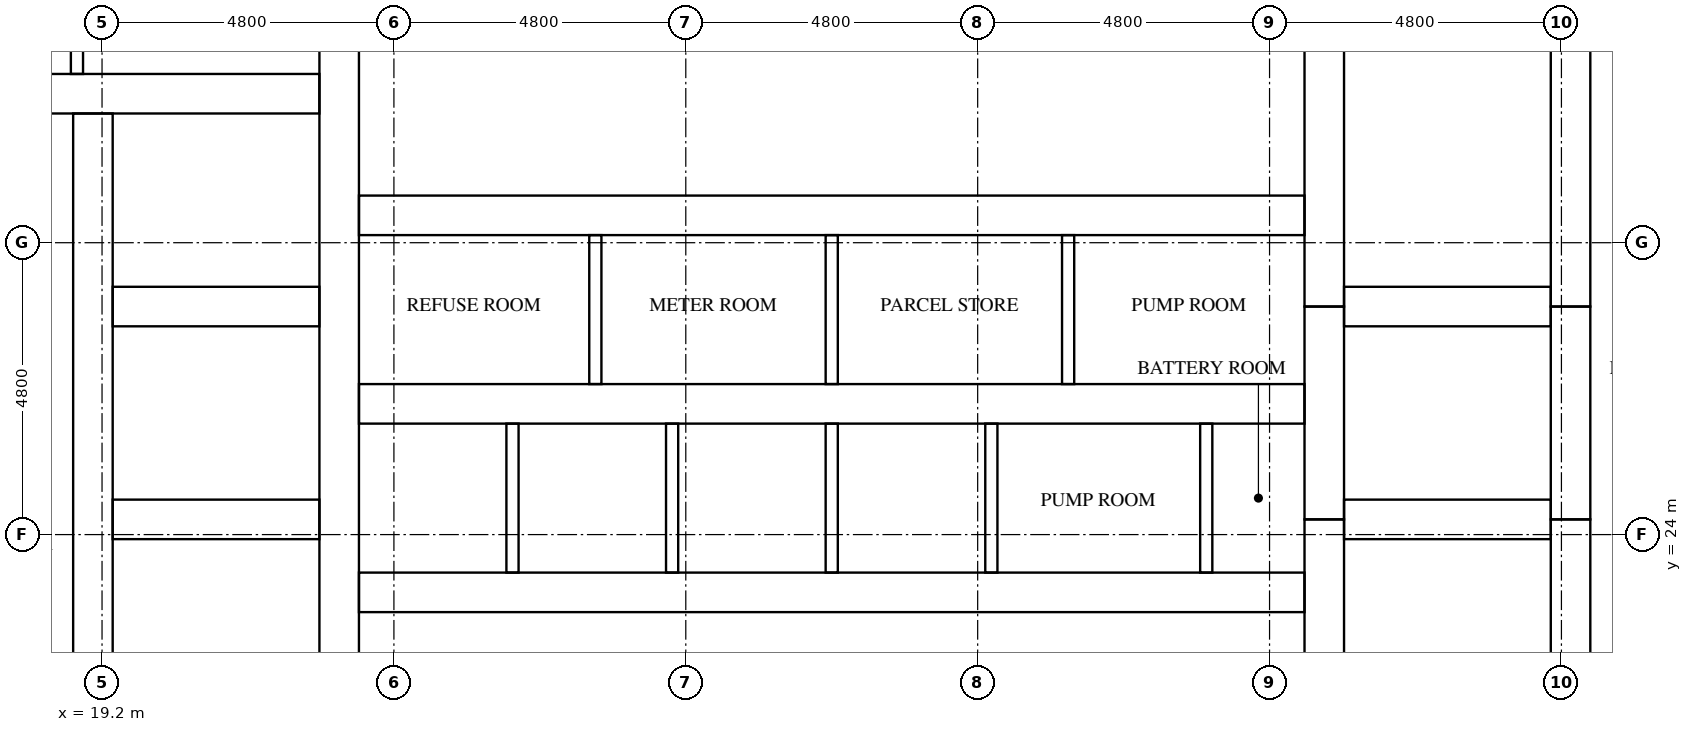
"""IFC4 building model, lengths in metres.
Left out: names, types, materials, properties, quantities, classifications, styles, units other than length and angle.
Written with IfcOpenShell. Run it as: python <this file> out.ifc"""

import sys

from ifc_helpers import new_model, si_unit, direction, frame, frame_2d, origin, place, context, subcontext, project, spatial, rectangle, extrude, element, fill, save


model = new_model("IFC4")
c1 = context("Model", 3, precision=1e-05, world=origin(), true_north=direction((0.0, 1.0)))
c2 = subcontext(c1, "Body", "Model", "MODEL_VIEW")
j1 = project(units=[si_unit("LENGTHUNIT", "METRE"), si_unit("PLANEANGLEUNIT", "RADIAN")], contexts=[c1])
p1 = place(None, origin())
s1 = spatial("IfcSite", under=j1, at=p1, CompositionType="ELEMENT")
p2 = place(p1, origin())
s2 = spatial("IfcBuilding", under=s1, at=p2, CompositionType="ELEMENT")
p3 = place(p2, frame((0.0, 0.0, 59.3)))
s3 = spatial("IfcBuildingStorey", under=s2, at=p3, CompositionType="ELEMENT", Elevation=59.3)
p4 = place(p3, frame((19.05, 15.9, 0.0), z_axis=(0.0, 0.0, 1.0), x_axis=(0.0, 1.0, 0.0)))
e1 = element("IfcWall", 1, at=p4, inside=s3, PredefinedType="SHEAR", context=c2, shape_type="SweptSolid", body=[
    extrude(rectangle(XDim=15.025, YDim=0.65, at=frame_2d((7.513, 0.0))), origin(), (0.0, 0.0, 1.0), 3.2),
])
p5 = place(p4, frame((9.55, 0.0, 0.0)))
e2 = element("IfcOpeningElement", 2, at=p5, cuts=e1, PredefinedType="OPENING", context=c2, shape_type="SweptSolid", body=[
    extrude(rectangle(XDim=1.1, YDim=2.1, at=frame_2d((0.55, 1.05))), frame((0.0, 0.335, 0.0), z_axis=(0.0, -1.0, 0.0), x_axis=(1.0, 0.0, 0.0)), (0.0, 0.0, 1.0), 0.67),
])
p6 = place(p4, frame((13.05, 0.0, 0.0)))
e3 = element("IfcOpeningElement", 3, at=p6, cuts=e1, PredefinedType="OPENING", context=c2, shape_type="SweptSolid", body=[
    extrude(rectangle(XDim=1.1, YDim=2.1, at=frame_2d((0.55, 1.05))), frame((0.0, 0.335, 0.0), z_axis=(0.0, -1.0, 0.0), x_axis=(1.0, 0.0, 0.0)), (0.0, 0.0, 1.0), 0.67),
])
p7 = place(p4, frame((0.3, 0.0, 0.0)))
e4 = element("IfcOpeningElement", 4, at=p7, cuts=e1, PredefinedType="OPENING", context=c2, shape_type="SweptSolid", body=[
    extrude(rectangle(XDim=1.2, YDim=2.1, at=frame_2d((0.6, 1.05))), frame((0.0, 0.335, 0.0), z_axis=(0.0, -1.0, 0.0), x_axis=(1.0, 0.0, 0.0)), (0.0, 0.0, 1.0), 0.67),
])
p8 = place(p3, frame((23.1, 15.9, 0.0), z_axis=(0.0, 0.0, 1.0), x_axis=(0.0, 1.0, 0.0)))
e5 = element("IfcWall", 5, at=p8, inside=s3, PredefinedType="SHEAR", context=c2, shape_type="SweptSolid", body=[
    extrude(rectangle(XDim=21.0, YDim=0.65, at=frame_2d((10.5, 0.0))), origin(), (0.0, 0.0, 1.0), 3.2),
])
p9 = place(p3, frame((39.3, 15.9, 0.0), z_axis=(0.0, 0.0, 1.0), x_axis=(0.0, 1.0, 0.0)))
e6 = element("IfcWall", 6, at=p9, inside=s3, PredefinedType="SHEAR", context=c2, shape_type="SweptSolid", body=[
    extrude(rectangle(XDim=8.35, YDim=0.65, at=frame_2d((4.175, 0.0))), origin(), (0.0, 0.0, 1.0), 3.2),
])
p10 = place(p3, frame((39.3, 24.25, 0.0), z_axis=(0.0, 0.0, 1.0), x_axis=(0.0, 1.0, 0.0)))
e7 = element("IfcWall", 7, at=p10, inside=s3, PredefinedType="SHEAR", context=c2, shape_type="SweptSolid", body=[
    extrude(rectangle(XDim=3.5, YDim=0.65, at=frame_2d((1.75, 0.0))), origin(), (0.0, 0.0, 1.0), 3.2),
])
p11 = place(p3, frame((39.3, 27.75, 0.0), z_axis=(0.0, 0.0, 1.0), x_axis=(0.0, 1.0, 0.0)))
e8 = element("IfcWall", 8, at=p11, inside=s3, PredefinedType="SHEAR", context=c2, shape_type="SweptSolid", body=[
    extrude(rectangle(XDim=9.15, YDim=0.65, at=frame_2d((4.575, 0.0))), origin(), (0.0, 0.0, 1.0), 3.2),
])
p12 = place(p3, frame((43.35, 15.9, 0.0), z_axis=(0.0, 0.0, 1.0), x_axis=(0.0, 1.0, 0.0)))
e9 = element("IfcWall", 9, at=p12, inside=s3, PredefinedType="SHEAR", context=c2, shape_type="SweptSolid", body=[
    extrude(rectangle(XDim=8.35, YDim=0.65, at=frame_2d((4.175, 0.0))), origin(), (0.0, 0.0, 1.0), 3.2),
])
p13 = place(p12, frame((0.3, 0.0, 0.0)))
e10 = element("IfcOpeningElement", 10, at=p13, cuts=e9, PredefinedType="OPENING", context=c2, shape_type="SweptSolid", body=[
    extrude(rectangle(XDim=1.2, YDim=2.1, at=frame_2d((0.6, 1.05))), frame((0.0, 0.335, 0.0), z_axis=(0.0, -1.0, 0.0), x_axis=(1.0, 0.0, 0.0)), (0.0, 0.0, 1.0), 0.67),
])
p14 = place(p3, frame((43.35, 24.25, 0.0), z_axis=(0.0, 0.0, 1.0), x_axis=(0.0, 1.0, 0.0)))
e11 = element("IfcWall", 11, at=p14, inside=s3, PredefinedType="SHEAR", context=c2, shape_type="SweptSolid", body=[
    extrude(rectangle(XDim=3.5, YDim=0.65, at=frame_2d((1.75, 0.0))), origin(), (0.0, 0.0, 1.0), 3.2),
])
p15 = place(p14, frame((1.2, 0.0, 0.0)))
e12 = element("IfcOpeningElement", 12, at=p15, cuts=e11, PredefinedType="OPENING", context=c2, shape_type="SweptSolid", body=[
    extrude(rectangle(XDim=1.1, YDim=2.1, at=frame_2d((0.55, 1.05))), frame((0.0, 0.335, 0.0), z_axis=(0.0, -1.0, 0.0), x_axis=(1.0, 0.0, 0.0)), (0.0, 0.0, 1.0), 0.67),
])
p16 = place(p3, frame((43.35, 27.75, 0.0), z_axis=(0.0, 0.0, 1.0), x_axis=(0.0, 1.0, 0.0)))
e13 = element("IfcWall", 13, at=p16, inside=s3, PredefinedType="SHEAR", context=c2, shape_type="SweptSolid", body=[
    extrude(rectangle(XDim=9.15, YDim=0.65, at=frame_2d((4.575, 0.0))), origin(), (0.0, 0.0, 1.0), 3.2),
])
p17 = place(p16, frame((7.65, 0.0, 0.0)))
e14 = element("IfcOpeningElement", 14, at=p17, cuts=e13, PredefinedType="OPENING", context=c2, shape_type="SweptSolid", body=[
    extrude(rectangle(XDim=1.2, YDim=2.1, at=frame_2d((0.6, 1.05))), frame((0.0, 0.335, 0.0), z_axis=(0.0, -1.0, 0.0), x_axis=(1.0, 0.0, 0.0)), (0.0, 0.0, 1.0), 0.67),
])
for number, where, z_axis, x_axis in (
    (15, (19.375, 24.25, 0.0), (0.0, 0.0, 1.0), (1.0, 0.0, 0.0)),
    (16, (19.375, 27.75, 0.0), (0.0, 0.0, 1.0), (1.0, 0.0, 0.0)),
):
    element("IfcWall", number, at=place(p3, frame(where, z_axis=z_axis, x_axis=x_axis)), inside=s3, PredefinedType="SHEAR", context=c2, shape_type="SweptSolid", body=[
        extrude(rectangle(XDim=3.4, YDim=0.65, at=frame_2d((1.7, 0.0))), origin(), (0.0, 0.0, 1.0), 3.2),
    ])
p18 = place(p3, frame((15.9, 31.25, 0.0), z_axis=(0.0, 0.0, 1.0), x_axis=(1.0, 0.0, 0.0)))
e17 = element("IfcWall", 17, at=p18, inside=s3, PredefinedType="SHEAR", context=c2, shape_type="SweptSolid", body=[
    extrude(rectangle(XDim=6.875, YDim=0.65, at=frame_2d((3.438, 0.0))), origin(), (0.0, 0.0, 1.0), 3.2),
])
for number, where, z_axis, x_axis in (
    (18, (39.625, 24.25, 0.0), (0.0, 0.0, 1.0), (1.0, 0.0, 0.0)),
    (19, (39.625, 27.75, 0.0), (0.0, 0.0, 1.0), (1.0, 0.0, 0.0)),
):
    element("IfcWall", number, at=place(p3, frame(where, z_axis=z_axis, x_axis=x_axis)), inside=s3, PredefinedType="SHEAR", context=c2, shape_type="SweptSolid", body=[
        extrude(rectangle(XDim=3.4, YDim=0.65, at=frame_2d((1.7, 0.0))), origin(), (0.0, 0.0, 1.0), 3.2),
    ])
p19 = place(p3, frame((23.425, 23.05, 0.0), z_axis=(0.0, 0.0, 1.0), x_axis=(1.0, 0.0, 0.0)))
e20 = element("IfcWall", 20, at=p19, inside=s3, PredefinedType="SHEAR", context=c2, shape_type="SweptSolid", body=[
    extrude(rectangle(XDim=15.55, YDim=0.65, at=frame_2d((7.775, 0.0))), origin(), (0.0, 0.0, 1.0), 3.2),
])
p20 = place(p19, frame((0.663, 0.0, 0.0)))
e21 = element("IfcOpeningElement", 21, at=p20, cuts=e20, PredefinedType="OPENING", context=c2, shape_type="SweptSolid", body=[
    extrude(rectangle(XDim=1.1, YDim=2.1, at=frame_2d((0.55, 1.05))), frame((0.0, 0.335, 0.0), z_axis=(0.0, -1.0, 0.0), x_axis=(1.0, 0.0, 0.0)), (0.0, 0.0, 1.0), 0.67),
])
p21 = place(p19, frame((3.288, 0.0, 0.0)))
e22 = element("IfcOpeningElement", 22, at=p21, cuts=e20, PredefinedType="OPENING", context=c2, shape_type="SweptSolid", body=[
    extrude(rectangle(XDim=1.1, YDim=2.1, at=frame_2d((0.55, 1.05))), frame((0.0, 0.335, 0.0), z_axis=(0.0, -1.0, 0.0), x_axis=(1.0, 0.0, 0.0)), (0.0, 0.0, 1.0), 0.67),
])
p22 = place(p19, frame((11.667, 0.0, 0.0)))
e23 = element("IfcOpeningElement", 23, at=p22, cuts=e20, PredefinedType="OPENING", context=c2, shape_type="SweptSolid", body=[
    extrude(rectangle(XDim=1.0, YDim=2.1, at=frame_2d((0.5, 1.05))), frame((0.0, 0.335, 0.0), z_axis=(0.0, -1.0, 0.0), x_axis=(1.0, 0.0, 0.0)), (0.0, 0.0, 1.0), 0.67),
])
p23 = place(p19, frame((14.292, 0.0, 0.0)))
e24 = element("IfcOpeningElement", 24, at=p23, cuts=e20, PredefinedType="OPENING", context=c2, shape_type="SweptSolid", body=[
    extrude(rectangle(XDim=1.0, YDim=2.1, at=frame_2d((0.5, 1.05))), frame((0.0, 0.335, 0.0), z_axis=(0.0, -1.0, 0.0), x_axis=(1.0, 0.0, 0.0)), (0.0, 0.0, 1.0), 0.67),
])
p24 = place(p3, frame((23.425, 26.15, 0.0), z_axis=(0.0, 0.0, 1.0), x_axis=(1.0, 0.0, 0.0)))
e25 = element("IfcWall", 25, at=p24, inside=s3, PredefinedType="SHEAR", context=c2, shape_type="SweptSolid", body=[
    extrude(rectangle(XDim=15.55, YDim=0.65, at=frame_2d((7.775, 0.0))), origin(), (0.0, 0.0, 1.0), 3.2),
])
p25 = place(p3, frame((23.425, 29.25, 0.0), z_axis=(0.0, 0.0, 1.0), x_axis=(1.0, 0.0, 0.0)))
e26 = element("IfcWall", 26, at=p25, inside=s3, PredefinedType="SHEAR", context=c2, shape_type="SweptSolid", body=[
    extrude(rectangle(XDim=15.55, YDim=0.65, at=frame_2d((7.775, 0.0))), origin(), (0.0, 0.0, 1.0), 3.2),
])
p26 = place(p25, frame((1.394, 0.0, 0.0)))
e27 = element("IfcOpeningElement", 27, at=p26, cuts=e26, PredefinedType="OPENING", context=c2, shape_type="SweptSolid", body=[
    extrude(rectangle(XDim=1.0, YDim=2.1, at=frame_2d((0.5, 1.05))), frame((0.0, 0.335, 0.0), z_axis=(0.0, -1.0, 0.0), x_axis=(1.0, 0.0, 0.0)), (0.0, 0.0, 1.0), 0.67),
])
p27 = place(p25, frame((5.331, 0.0, 0.0)))
e28 = element("IfcOpeningElement", 28, at=p27, cuts=e26, PredefinedType="OPENING", context=c2, shape_type="SweptSolid", body=[
    extrude(rectangle(XDim=1.0, YDim=2.1, at=frame_2d((0.5, 1.05))), frame((0.0, 0.335, 0.0), z_axis=(0.0, -1.0, 0.0), x_axis=(1.0, 0.0, 0.0)), (0.0, 0.0, 1.0), 0.67),
])
p28 = place(p25, frame((9.219, 0.0, 0.0)))
e29 = element("IfcOpeningElement", 29, at=p28, cuts=e26, PredefinedType="OPENING", context=c2, shape_type="SweptSolid", body=[
    extrude(rectangle(XDim=1.0, YDim=2.1, at=frame_2d((0.5, 1.05))), frame((0.0, 0.335, 0.0), z_axis=(0.0, -1.0, 0.0), x_axis=(1.0, 0.0, 0.0)), (0.0, 0.0, 1.0), 0.67),
])
p29 = place(p25, frame((13.156, 0.0, 0.0)))
e30 = element("IfcOpeningElement", 30, at=p29, cuts=e26, PredefinedType="OPENING", context=c2, shape_type="SweptSolid", body=[
    extrude(rectangle(XDim=1.0, YDim=2.1, at=frame_2d((0.5, 1.05))), frame((0.0, 0.335, 0.0), z_axis=(0.0, -1.0, 0.0), x_axis=(1.0, 0.0, 0.0)), (0.0, 0.0, 1.0), 0.67),
])
for number, where, z_axis, x_axis in (
    (31, (25.95, 23.375, 0.0), (0.0, 0.0, 1.0), (0.0, 1.0, 0.0)),
    (32, (28.575, 23.375, 0.0), (0.0, 0.0, 1.0), (0.0, 1.0, 0.0)),
    (33, (31.2, 23.375, 0.0), (0.0, 0.0, 1.0), (0.0, 1.0, 0.0)),
    (34, (33.825, 23.375, 0.0), (0.0, 0.0, 1.0), (0.0, 1.0, 0.0)),
):
    element("IfcWall", number, at=place(p3, frame(where, z_axis=z_axis, x_axis=x_axis)), inside=s3, PredefinedType="SOLIDWALL", context=c2, shape_type="SweptSolid", body=[
        extrude(rectangle(XDim=2.45, YDim=0.2, at=frame_2d((1.225, 0.0))), origin(), (0.0, 0.0, 1.0), 3.2),
    ])
p30 = place(p3, frame((18.788, 31.575, 0.0), z_axis=(0.0, 0.0, 1.0), x_axis=(0.0, 1.0, 0.0)))
e35 = element("IfcWall", 35, at=p30, inside=s3, PredefinedType="PARTITIONING", context=c2, shape_type="SweptSolid", body=[
    extrude(rectangle(XDim=5.325, YDim=0.2, at=frame_2d((2.663, 0.0))), origin(), (0.0, 0.0, 1.0), 3.2),
])
for number, where, z_axis, x_axis in (
    (36, (37.359, 23.375, 0.0), (0.0, 0.0, 1.0), (0.0, 1.0, 0.0)),
    (37, (27.312, 26.475, 0.0), (0.0, 0.0, 1.0), (0.0, 1.0, 0.0)),
    (38, (31.2, 26.475, 0.0), (0.0, 0.0, 1.0), (0.0, 1.0, 0.0)),
    (39, (35.087, 26.475, 0.0), (0.0, 0.0, 1.0), (0.0, 1.0, 0.0)),
):
    element("IfcWall", number, at=place(p3, frame(where, z_axis=z_axis, x_axis=x_axis)), inside=s3, PredefinedType="PARTITIONING", context=c2, shape_type="SweptSolid", body=[
        extrude(rectangle(XDim=2.45, YDim=0.2, at=frame_2d((1.225, 0.0))), origin(), (0.0, 0.0, 1.0), 3.2),
    ])
p31 = place(p20, origin())
e40 = element("IfcDoor", 40, at=p31, inside=s3, OperationType="DOUBLE_DOOR_SLIDING", PredefinedType="DOOR", context=c2, shape_type="SweptSolid", body=[
    extrude(rectangle(XDim=1.1, YDim=2.1, at=frame_2d((0.55, 1.05))), frame((0.0, 0.025, 0.0), z_axis=(0.0, -1.0, 0.0), x_axis=(1.0, 0.0, 0.0)), (0.0, 0.0, 1.0), 0.05),
])
fill(e21, e40)
p32 = place(p21, origin())
e41 = element("IfcDoor", 41, at=p32, inside=s3, OperationType="DOUBLE_DOOR_SLIDING", PredefinedType="DOOR", context=c2, shape_type="SweptSolid", body=[
    extrude(rectangle(XDim=1.1, YDim=2.1, at=frame_2d((0.55, 1.05))), frame((0.0, 0.025, 0.0), z_axis=(0.0, -1.0, 0.0), x_axis=(1.0, 0.0, 0.0)), (0.0, 0.0, 1.0), 0.05),
])
fill(e22, e41)
p33 = place(p5, origin())
e42 = element("IfcDoor", 42, at=p33, inside=s3, OperationType="DOUBLE_DOOR_SLIDING", PredefinedType="DOOR", context=c2, shape_type="SweptSolid", body=[
    extrude(rectangle(XDim=1.1, YDim=2.1, at=frame_2d((0.55, 1.05))), frame((0.0, 0.025, 0.0), z_axis=(0.0, -1.0, 0.0), x_axis=(1.0, 0.0, 0.0)), (0.0, 0.0, 1.0), 0.05),
])
fill(e2, e42)
p34 = place(p6, origin())
e43 = element("IfcDoor", 43, at=p34, inside=s3, OperationType="DOUBLE_DOOR_SLIDING", PredefinedType="DOOR", context=c2, shape_type="SweptSolid", body=[
    extrude(rectangle(XDim=1.1, YDim=2.1, at=frame_2d((0.55, 1.05))), frame((0.0, 0.025, 0.0), z_axis=(0.0, -1.0, 0.0), x_axis=(1.0, 0.0, 0.0)), (0.0, 0.0, 1.0), 0.05),
])
fill(e3, e43)
p35 = place(p15, origin())
e44 = element("IfcDoor", 44, at=p35, inside=s3, OperationType="DOUBLE_DOOR_SLIDING", PredefinedType="DOOR", context=c2, shape_type="SweptSolid", body=[
    extrude(rectangle(XDim=1.1, YDim=2.1, at=frame_2d((0.55, 1.05))), frame((0.0, 0.025, 0.0), z_axis=(0.0, -1.0, 0.0), x_axis=(1.0, 0.0, 0.0)), (0.0, 0.0, 1.0), 0.05),
])
fill(e12, e44)
p36 = place(p22, frame((1.0, 0.0, 0.0), z_axis=(0.0, 0.0, 1.0), x_axis=(-1.0, 0.0, 0.0)))
e45 = element("IfcDoor", 45, at=p36, inside=s3, OperationType="SINGLE_SWING_LEFT", PredefinedType="DOOR", context=c2, shape_type="SweptSolid", body=[
    extrude(rectangle(XDim=1.0, YDim=2.1, at=frame_2d((0.5, 1.05))), frame((0.0, 0.025, 0.0), z_axis=(0.0, -1.0, 0.0), x_axis=(1.0, 0.0, 0.0)), (0.0, 0.0, 1.0), 0.05),
])
fill(e23, e45)
p37 = place(p23, frame((1.0, 0.0, 0.0), z_axis=(0.0, 0.0, 1.0), x_axis=(-1.0, 0.0, 0.0)))
e46 = element("IfcDoor", 46, at=p37, inside=s3, OperationType="SINGLE_SWING_RIGHT", PredefinedType="DOOR", context=c2, shape_type="SweptSolid", body=[
    extrude(rectangle(XDim=1.0, YDim=2.1, at=frame_2d((0.5, 1.05))), frame((0.0, 0.025, 0.0), z_axis=(0.0, -1.0, 0.0), x_axis=(1.0, 0.0, 0.0)), (0.0, 0.0, 1.0), 0.05),
])
fill(e24, e46)
p38 = place(p26, origin())
e47 = element("IfcDoor", 47, at=p38, inside=s3, OperationType="SINGLE_SWING_LEFT", PredefinedType="DOOR", context=c2, shape_type="SweptSolid", body=[
    extrude(rectangle(XDim=1.0, YDim=2.1, at=frame_2d((0.5, 1.05))), frame((0.0, 0.025, 0.0), z_axis=(0.0, -1.0, 0.0), x_axis=(1.0, 0.0, 0.0)), (0.0, 0.0, 1.0), 0.05),
])
fill(e27, e47)
p39 = place(p27, origin())
e48 = element("IfcDoor", 48, at=p39, inside=s3, OperationType="SINGLE_SWING_RIGHT", PredefinedType="DOOR", context=c2, shape_type="SweptSolid", body=[
    extrude(rectangle(XDim=1.0, YDim=2.1, at=frame_2d((0.5, 1.05))), frame((0.0, 0.025, 0.0), z_axis=(0.0, -1.0, 0.0), x_axis=(1.0, 0.0, 0.0)), (0.0, 0.0, 1.0), 0.05),
])
fill(e28, e48)
p40 = place(p28, origin())
e49 = element("IfcDoor", 49, at=p40, inside=s3, OperationType="SINGLE_SWING_LEFT", PredefinedType="DOOR", context=c2, shape_type="SweptSolid", body=[
    extrude(rectangle(XDim=1.0, YDim=2.1, at=frame_2d((0.5, 1.05))), frame((0.0, 0.025, 0.0), z_axis=(0.0, -1.0, 0.0), x_axis=(1.0, 0.0, 0.0)), (0.0, 0.0, 1.0), 0.05),
])
fill(e29, e49)
p41 = place(p29, origin())
e50 = element("IfcDoor", 50, at=p41, inside=s3, OperationType="SINGLE_SWING_RIGHT", PredefinedType="DOOR", context=c2, shape_type="SweptSolid", body=[
    extrude(rectangle(XDim=1.0, YDim=2.1, at=frame_2d((0.5, 1.05))), frame((0.0, 0.025, 0.0), z_axis=(0.0, -1.0, 0.0), x_axis=(1.0, 0.0, 0.0)), (0.0, 0.0, 1.0), 0.05),
])
fill(e30, e50)
save(model, sys.argv[1])
